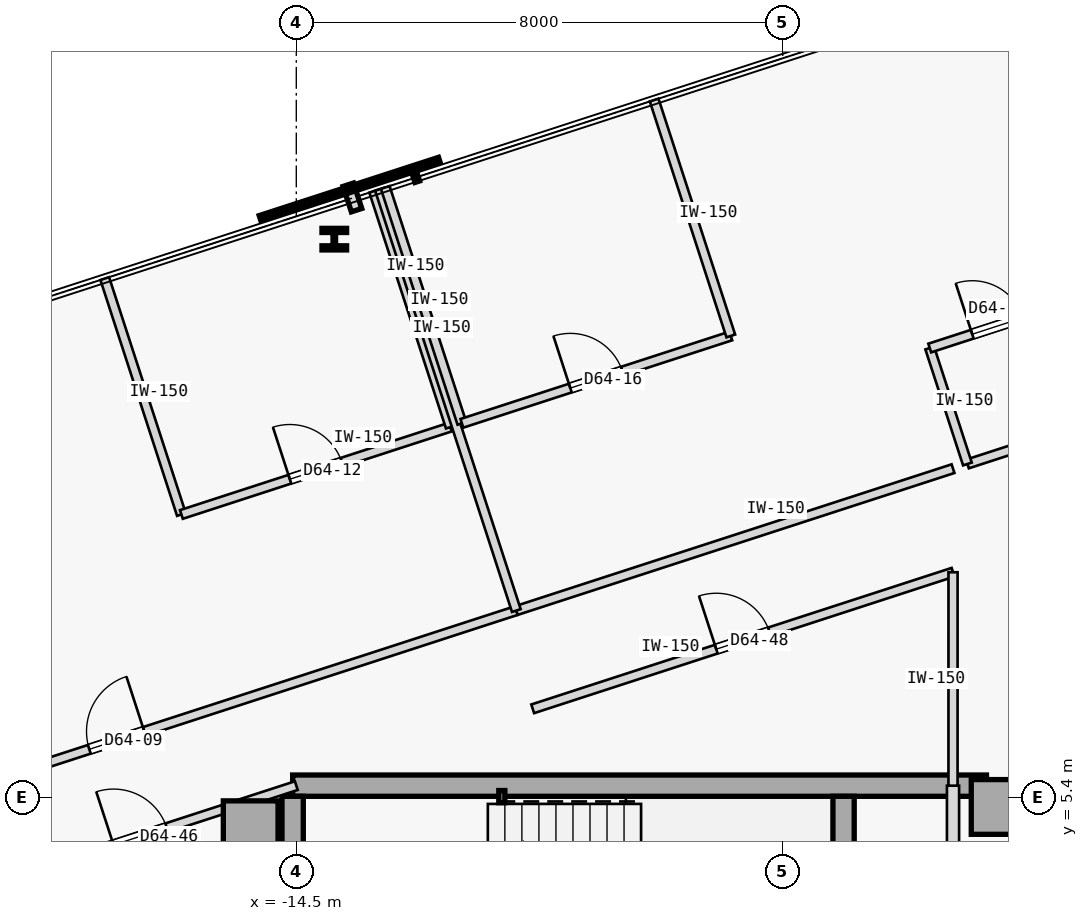
"""IFC4 building model, lengths in metres.
Left out: names, types, materials, properties, quantities, classifications, styles, units other than length and angle.
Written with IfcOpenShell. Run it as: python <this file> out.ifc"""

import sys

from ifc_helpers import new_model, si_unit, direction, frame, frame_2d, origin, origin_2d, place, context, subcontext, project, spatial, rectangle, hollow_rectangle, i_section, extrude, element, fill, save


model = new_model("IFC4")
c1 = context("Model", 3, precision=1e-05, world=origin(), true_north=direction((0.0, 1.0)))
c2 = subcontext(c1, "Body", "Model", "MODEL_VIEW")
j1 = project(units=[si_unit("LENGTHUNIT", "METRE"), si_unit("PLANEANGLEUNIT", "RADIAN")], contexts=[c1])
p1 = place(None, origin())
s1 = spatial("IfcSite", under=j1, at=p1, CompositionType="ELEMENT")
p2 = place(p1, origin())
s2 = spatial("IfcBuilding", under=s1, at=p2, CompositionType="ELEMENT")
p3 = place(p2, frame((0.0, 0.0, 241.05)))
s3 = spatial("IfcBuildingStorey", under=s2, at=p3, CompositionType="ELEMENT", Elevation=241.05)
for number, where, z_axis, x_axis in (
    (1, (-15.25, 4.9, 0.0), (0.0, 0.0, 1.0), (1.0, 0.0, 0.0)),
    (2, (-2.95, 5.25, 0.0), (0.0, 0.0, 1.0), (1.0, 0.0, 0.0)),
):
    element("IfcColumn", number, at=place(p3, frame(where, z_axis=z_axis, x_axis=x_axis)), inside=s3, PredefinedType="COLUMN", context=c2, shape_type="SweptSolid", body=[
        extrude(rectangle(XDim=0.9, YDim=0.9, at=origin_2d()), origin(), (0.0, 0.0, 1.0), 3.35),
    ])
p4 = place(p3, frame((-14.56, 5.6, 0.0), z_axis=(0.0, 0.0, 1.0), x_axis=(1.0, 0.0, 0.0)))
e3 = element("IfcWall", 3, at=p4, inside=s3, PredefinedType="SHEAR", context=c2, shape_type="SweptSolid", body=[
    extrude(rectangle(XDim=11.41, YDim=0.35, at=frame_2d((5.705, 0.0))), origin(), (0.0, 0.0, 1.0), 3.125),
])
p5 = place(p3, frame((-14.56, -5.425, 0.0), z_axis=(0.0, 0.0, 1.0), x_axis=(0.0, 1.0, 0.0)))
e4 = element("IfcWall", 4, at=p5, inside=s3, PredefinedType="SHEAR", context=c2, shape_type="SweptSolid", body=[
    extrude(rectangle(XDim=10.85, YDim=0.35, at=frame_2d((5.425, 0.0))), origin(), (0.0, 0.0, 1.0), 3.125),
])
p6 = place(p3, frame((-5.5, 2.15, 0.0), z_axis=(0.0, 0.0, 1.0), x_axis=(0.0, 1.0, 0.0)))
e5 = element("IfcWall", 5, at=p6, inside=s3, PredefinedType="SHEAR", context=c2, shape_type="SweptSolid", body=[
    extrude(rectangle(XDim=3.275, YDim=0.35, at=frame_2d((1.638, 0.0))), origin(), (0.0, 0.0, 1.0), 3.125),
])
p7 = place(p3, frame((-11.12, 5.42, 0.0), z_axis=(0.0, 0.0, 1.0), x_axis=(1.0, 0.0, 0.0)))
e6 = element("IfcColumn", 6, at=p7, inside=s3, PredefinedType="COLUMN", context=c2, shape_type="SweptSolid", body=[
    extrude(hollow_rectangle(XDim=0.1, YDim=0.2, WallThickness=0.008, at=origin_2d()), origin(), (0.0, 0.0, 1.0), 3.35),
])
p8 = place(p3, frame((-13.875, 14.587, 0.0), z_axis=(0.0, 0.0, 1.0), x_axis=(1.0, 0.0, 0.0)))
e7 = element("IfcColumn", 7, at=p8, inside=s3, PredefinedType="COLUMN", context=c2, shape_type="SweptSolid", body=[
    extrude(i_section(OverallWidth=0.405, OverallDepth=0.355, WebThickness=0.042, FlangeThickness=0.068, FilletRadius=0.015, at=origin_2d()), origin(), (0.0, 0.0, 1.0), 3.35),
])
p9 = place(p3, frame((-3.7, -1.15, 0.0), z_axis=(0.0, 0.0, 1.0), x_axis=(0.0, 1.0, 0.0)))
e8 = element("IfcWall", 8, at=p9, inside=s3, PredefinedType="STANDARD", context=c2, shape_type="SweptSolid", body=[
    extrude(rectangle(XDim=6.75, YDim=0.2, at=frame_2d((3.375, 0.0))), origin(), (0.0, 0.0, 1.0), 3.125),
])
p10 = place(p9, frame((3.6, 0.0, 0.0)))
e9 = element("IfcOpeningElement", 9, at=p10, cuts=e8, PredefinedType="OPENING", context=c2, shape_type="SweptSolid", body=[
    extrude(rectangle(XDim=0.92, YDim=2.15, at=frame_2d((0.46, 1.075))), frame((0.0, 0.11, 0.0), z_axis=(0.0, -1.0, 0.0), x_axis=(1.0, 0.0, 0.0)), (0.0, 0.0, 1.0), 0.22),
])
p11 = place(p3, frame((-24.022, 4.21, 0.0), z_axis=(0.0, 0.0, 1.0), x_axis=(0.951058997127, 0.309009359055, 0.0)))
e10 = element("IfcWall", 10, at=p11, inside=s3, PredefinedType="PARTITIONING", context=c2, shape_type="SweptSolid", body=[
    extrude(rectangle(XDim=13.817, YDim=0.15, at=frame_2d((6.908, 0.0))), origin(), (0.0, 0.0, 1.0), 3.125),
])
p12 = place(p11, frame((6.434, 0.0, 0.0)))
e11 = element("IfcOpeningElement", 11, at=p12, cuts=e10, PredefinedType="OPENING", context=c2, shape_type="SweptSolid", body=[
    extrude(rectangle(XDim=0.95, YDim=2.15, at=frame_2d((0.475, 1.075))), frame((0.0, 0.085, 0.0), z_axis=(0.0, -1.0, 0.0), x_axis=(1.0, 0.0, 0.0)), (0.0, 0.0, 1.0), 0.17),
])
p13 = place(p3, frame((-10.882, 8.479, 0.0), z_axis=(0.0, 0.0, 1.0), x_axis=(0.951051887333, 0.309031240494, 0.0)))
e12 = element("IfcWall", 12, at=p13, inside=s3, PredefinedType="PARTITIONING", context=c2, shape_type="SweptSolid", body=[
    extrude(rectangle(XDim=7.551, YDim=0.15, at=frame_2d((3.775, 0.0))), origin(), (0.0, 0.0, 1.0), 3.125),
])
p14 = place(p3, frame((-3.463, 10.89, 0.0), z_axis=(0.0, 0.0, 1.0), x_axis=(0.951045519245, 0.309050837767, 0.0)))
e13 = element("IfcWall", 13, at=p14, inside=s3, PredefinedType="PARTITIONING", context=c2, shape_type="SweptSolid", body=[
    extrude(rectangle(XDim=2.35, YDim=0.15, at=frame_2d((1.175, 0.0))), origin(), (0.0, 0.0, 1.0), 3.125),
])
p15 = place(p3, frame((-17.792, 4.531, 0.0), z_axis=(0.0, 0.0, 1.0), x_axis=(0.951047546178, 0.309044600193, 0.0)))
e14 = element("IfcWall", 14, at=p15, inside=s3, PredefinedType="PARTITIONING", context=c2, shape_type="SweptSolid", body=[
    extrude(rectangle(XDim=3.461, YDim=0.15, at=frame_2d((1.73, 0.0))), origin(), (0.0, 0.0, 1.0), 3.125),
])
p16 = place(p15, frame((0.302, 0.0, 0.0)))
e15 = element("IfcOpeningElement", 15, at=p16, cuts=e14, PredefinedType="OPENING", context=c2, shape_type="SweptSolid", body=[
    extrude(rectangle(XDim=0.92, YDim=2.15, at=frame_2d((0.46, 1.075))), frame((0.0, 0.085, 0.0), z_axis=(0.0, -1.0, 0.0), x_axis=(1.0, 0.0, 0.0)), (0.0, 0.0, 1.0), 0.17),
])
p17 = place(p3, frame((-10.612, 6.864, 0.0), z_axis=(0.0, 0.0, 1.0), x_axis=(0.951060972078, 0.309003280548, 0.0)))
e16 = element("IfcWall", 16, at=p17, inside=s3, PredefinedType="PARTITIONING", context=c2, shape_type="SweptSolid", body=[
    extrude(rectangle(XDim=7.268, YDim=0.15, at=frame_2d((3.634, 0.0))), origin(), (0.0, 0.0, 1.0), 3.125),
])
p18 = place(p17, frame((3.174, 0.0, 0.0)))
e17 = element("IfcOpeningElement", 17, at=p18, cuts=e16, PredefinedType="OPENING", context=c2, shape_type="SweptSolid", body=[
    extrude(rectangle(XDim=0.92, YDim=2.15, at=frame_2d((0.46, 1.075))), frame((0.0, 0.085, 0.0), z_axis=(0.0, -1.0, 0.0), x_axis=(1.0, 0.0, 0.0)), (0.0, 0.0, 1.0), 0.17),
])
p19 = place(p3, frame((-3.7, 5.6, 0.0), z_axis=(0.0, 0.0, 1.0), x_axis=(0.000139120755, 0.999999990323, 0.0)))
e18 = element("IfcWall", 18, at=p19, inside=s3, PredefinedType="PARTITIONING", context=c2, shape_type="SweptSolid", body=[
    extrude(rectangle(XDim=3.51, YDim=0.15, at=frame_2d((1.755, 0.0))), origin(), (0.0, 0.0, 1.0), 3.125),
])
p20 = place(p3, frame((-16.389, 10.06, 0.0), z_axis=(0.0, 0.0, 1.0), x_axis=(-0.309018403393, 0.951056058476, 0.0)))
e19 = element("IfcWall", 19, at=p20, inside=s3, PredefinedType="PARTITIONING", context=c2, shape_type="SweptSolid", body=[
    extrude(rectangle(XDim=4.079, YDim=0.15, at=frame_2d((2.04, 0.0))), origin(), (0.0, 0.0, 1.0), 3.125),
])
p21 = place(p3, frame((-16.389, 10.06, 0.0), z_axis=(0.0, 0.0, 1.0), x_axis=(0.951050272606, 0.309036209813, 0.0)))
e20 = element("IfcWall", 20, at=p21, inside=s3, PredefinedType="PARTITIONING", context=c2, shape_type="SweptSolid", body=[
    extrude(rectangle(XDim=4.65, YDim=0.15, at=frame_2d((2.325, 0.0))), origin(), (0.0, 0.0, 1.0), 3.125),
])
p22 = place(p21, frame((1.875, 0.0, 0.0)))
e21 = element("IfcOpeningElement", 21, at=p22, cuts=e20, PredefinedType="OPENING", context=c2, shape_type="SweptSolid", body=[
    extrude(rectangle(XDim=0.9, YDim=2.15, at=frame_2d((0.45, 1.075))), frame((0.0, 0.085, 0.0), z_axis=(0.0, -1.0, 0.0), x_axis=(1.0, 0.0, 0.0)), (0.0, 0.0, 1.0), 0.17),
])
p23 = place(p3, frame((-11.967, 11.497, 0.0), z_axis=(0.0, 0.0, 1.0), x_axis=(-0.309018403393, 0.951056058476, 0.0)))
e22 = element("IfcWall", 22, at=p23, inside=s3, PredefinedType="PARTITIONING", context=c2, shape_type="SweptSolid", body=[
    extrude(rectangle(XDim=4.079, YDim=0.15, at=frame_2d((2.04, 0.0))), origin(), (0.0, 0.0, 1.0), 3.125),
])
p24 = place(p3, frame((-10.882, 8.479, 0.0), z_axis=(0.0, 0.0, 1.0), x_axis=(-0.308998913866, 0.951062390819, 0.0)))
e23 = element("IfcWall", 23, at=p24, inside=s3, PredefinedType="PARTITIONING", context=c2, shape_type="SweptSolid", body=[
    extrude(rectangle(XDim=7.284, YDim=0.15, at=frame_2d((3.642, 0.0))), origin(), (0.0, 0.0, 1.0), 3.125),
])
p25 = place(p3, frame((-3.463, 10.89, 0.0), z_axis=(0.0, 0.0, 1.0), x_axis=(-0.308912611775, 0.951090425925, 0.0)))
e24 = element("IfcWall", 24, at=p25, inside=s3, PredefinedType="PARTITIONING", context=c2, shape_type="SweptSolid", body=[
    extrude(rectangle(XDim=2.005, YDim=0.15, at=frame_2d((1.002, 0.0))), origin(), (0.0, 0.0, 1.0), 3.125),
])
p26 = place(p3, frame((-4.083, 12.797, 0.0), z_axis=(0.0, 0.0, 1.0), x_axis=(0.951066131077, 0.308987401554, 0.0)))
e25 = element("IfcWall", 25, at=p26, inside=s3, PredefinedType="PARTITIONING", context=c2, shape_type="SweptSolid", body=[
    extrude(rectangle(XDim=2.35, YDim=0.15, at=frame_2d((1.175, 0.0))), origin(), (0.0, 0.0, 1.0), 3.125),
])
p27 = place(p26, frame((0.735, 0.0, 0.0)))
e26 = element("IfcOpeningElement", 26, at=p27, cuts=e25, PredefinedType="OPENING", context=c2, shape_type="SweptSolid", body=[
    extrude(rectangle(XDim=0.88, YDim=2.15, at=frame_2d((0.44, 1.075))), frame((0.0, 0.085, 0.0), z_axis=(0.0, -1.0, 0.0), x_axis=(1.0, 0.0, 0.0)), (0.0, 0.0, 1.0), 0.17),
])
p28 = place(p3, frame((-11.777, 11.559, 0.0), z_axis=(0.0, 0.0, 1.0), x_axis=(-0.309018403393, 0.951056058476, 0.0)))
e27 = element("IfcWall", 27, at=p28, inside=s3, PredefinedType="PARTITIONING", context=c2, shape_type="SweptSolid", body=[
    extrude(rectangle(XDim=4.079, YDim=0.15, at=frame_2d((2.04, 0.0))), origin(), (0.0, 0.0, 1.0), 3.125),
])
p29 = place(p3, frame((-11.777, 11.559, 0.0), z_axis=(0.0, 0.0, 1.0), x_axis=(0.951050272606, 0.309036209813, 0.0)))
e28 = element("IfcWall", 28, at=p29, inside=s3, PredefinedType="PARTITIONING", context=c2, shape_type="SweptSolid", body=[
    extrude(rectangle(XDim=4.65, YDim=0.15, at=frame_2d((2.325, 0.0))), origin(), (0.0, 0.0, 1.0), 3.125),
])
p30 = place(p29, frame((1.875, 0.0, 0.0)))
e29 = element("IfcOpeningElement", 29, at=p30, cuts=e28, PredefinedType="OPENING", context=c2, shape_type="SweptSolid", body=[
    extrude(rectangle(XDim=0.9, YDim=2.15, at=frame_2d((0.45, 1.075))), frame((0.0, 0.085, 0.0), z_axis=(0.0, -1.0, 0.0), x_axis=(1.0, 0.0, 0.0)), (0.0, 0.0, 1.0), 0.17),
])
p31 = place(p3, frame((-7.354, 12.996, 0.0), z_axis=(0.0, 0.0, 1.0), x_axis=(-0.309018403393, 0.951056058476, 0.0)))
e30 = element("IfcWall", 30, at=p31, inside=s3, PredefinedType="PARTITIONING", context=c2, shape_type="SweptSolid", body=[
    extrude(rectangle(XDim=4.079, YDim=0.15, at=frame_2d((2.04, 0.0))), origin(), (0.0, 0.0, 1.0), 3.125),
])
p32 = place(p12, origin())
e31 = element("IfcDoor", 31, at=p32, inside=s3, OperationType="SINGLE_SWING_RIGHT", PredefinedType="DOOR", context=c2, shape_type="SweptSolid", body=[
    extrude(rectangle(XDim=0.95, YDim=2.15, at=frame_2d((0.475, 1.075))), frame((0.0, 0.025, 0.0), z_axis=(0.0, -1.0, 0.0), x_axis=(1.0, 0.0, 0.0)), (0.0, 0.0, 1.0), 0.05),
])
fill(e11, e31)
p33 = place(p22, origin())
e32 = element("IfcDoor", 32, at=p33, inside=s3, OperationType="SINGLE_SWING_LEFT", PredefinedType="DOOR", context=c2, shape_type="SweptSolid", body=[
    extrude(rectangle(XDim=0.9, YDim=2.15, at=frame_2d((0.45, 1.075))), frame((0.0, 0.025, 0.0), z_axis=(0.0, -1.0, 0.0), x_axis=(1.0, 0.0, 0.0)), (0.0, 0.0, 1.0), 0.05),
])
fill(e21, e32)
p34 = place(p27, origin())
e33 = element("IfcDoor", 33, at=p34, inside=s3, OperationType="SINGLE_SWING_LEFT", PredefinedType="DOOR", context=c2, shape_type="SweptSolid", body=[
    extrude(rectangle(XDim=0.88, YDim=2.15, at=frame_2d((0.44, 1.075))), frame((0.0, 0.025, 0.0), z_axis=(0.0, -1.0, 0.0), x_axis=(1.0, 0.0, 0.0)), (0.0, 0.0, 1.0), 0.05),
])
fill(e26, e33)
p35 = place(p30, origin())
e34 = element("IfcDoor", 34, at=p35, inside=s3, OperationType="SINGLE_SWING_LEFT", PredefinedType="DOOR", context=c2, shape_type="SweptSolid", body=[
    extrude(rectangle(XDim=0.9, YDim=2.15, at=frame_2d((0.45, 1.075))), frame((0.0, 0.025, 0.0), z_axis=(0.0, -1.0, 0.0), x_axis=(1.0, 0.0, 0.0)), (0.0, 0.0, 1.0), 0.05),
])
fill(e29, e34)
p36 = place(p16, origin())
e35 = element("IfcDoor", 35, at=p36, inside=s3, OperationType="SINGLE_SWING_LEFT", PredefinedType="DOOR", context=c2, shape_type="SweptSolid", body=[
    extrude(rectangle(XDim=0.92, YDim=2.15, at=frame_2d((0.46, 1.075))), frame((0.0, 0.025, 0.0), z_axis=(0.0, -1.0, 0.0), x_axis=(1.0, 0.0, 0.0)), (0.0, 0.0, 1.0), 0.05),
])
fill(e15, e35)
p37 = place(p18, origin())
e36 = element("IfcDoor", 36, at=p37, inside=s3, OperationType="SINGLE_SWING_LEFT", PredefinedType="DOOR", context=c2, shape_type="SweptSolid", body=[
    extrude(rectangle(XDim=0.92, YDim=2.15, at=frame_2d((0.46, 1.075))), frame((0.0, 0.025, 0.0), z_axis=(0.0, -1.0, 0.0), x_axis=(1.0, 0.0, 0.0)), (0.0, 0.0, 1.0), 0.05),
])
fill(e17, e36)
save(model, sys.argv[1])
